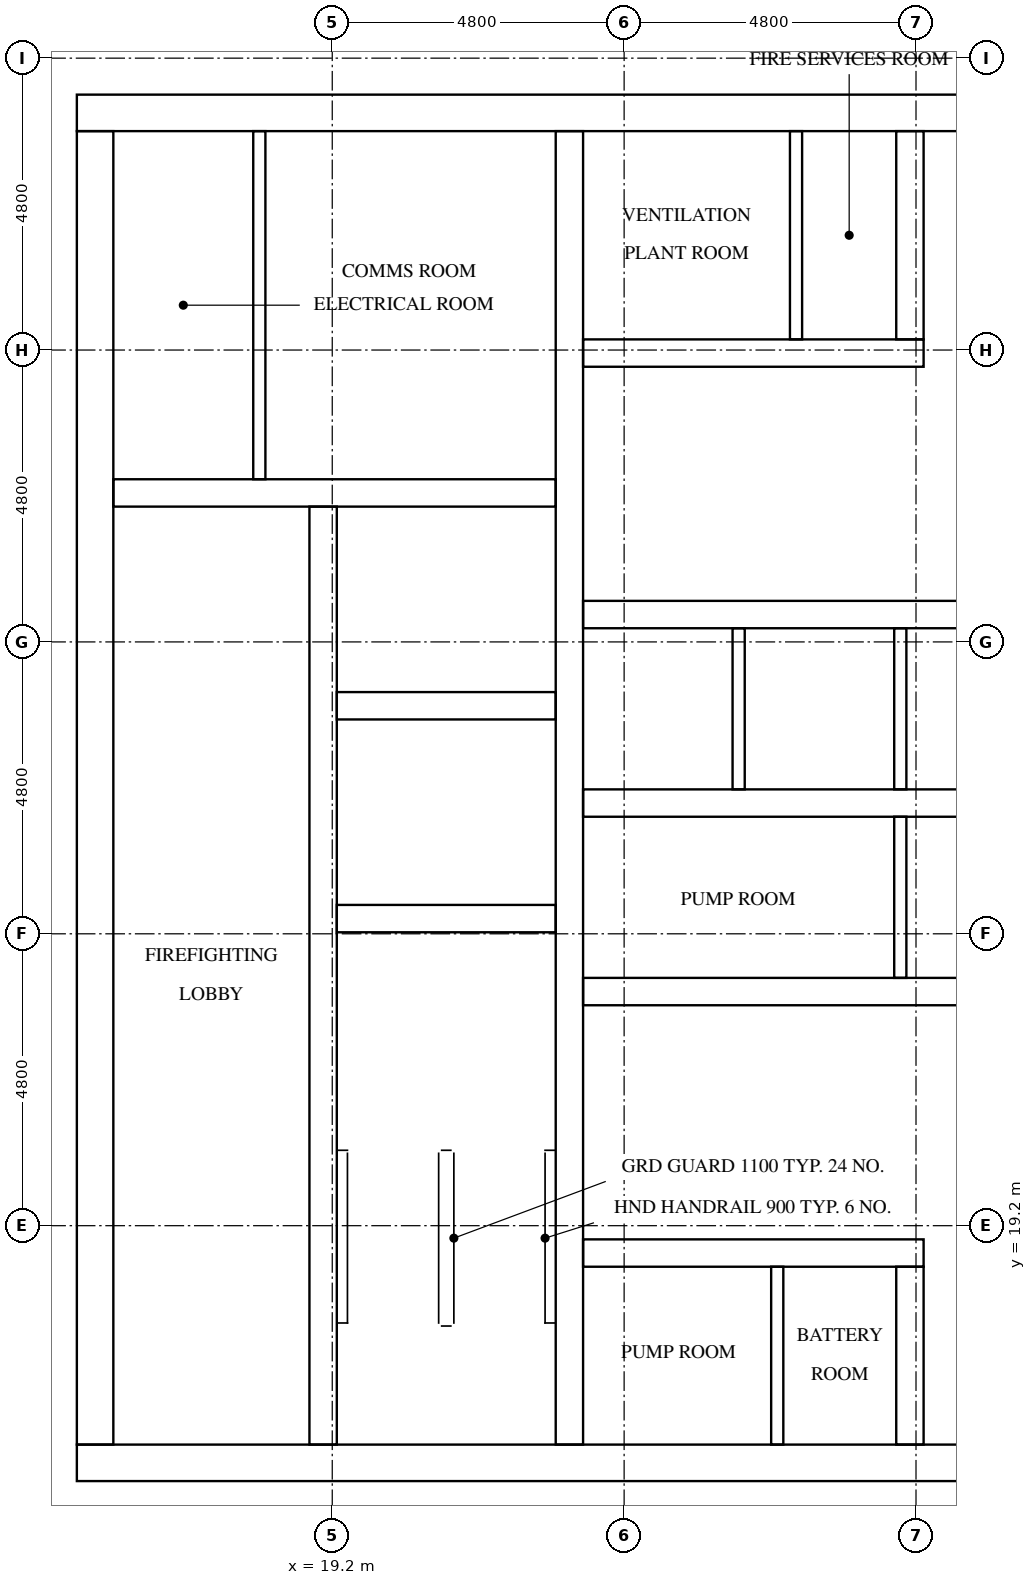
"""IFC4 building model, lengths in metres.
Left out: names, types, materials, properties, quantities, classifications, styles, units other than length and angle.
Written with IfcOpenShell. Run it as: python <this file> out.ifc"""

import sys

from ifc_helpers import new_model, si_unit, direction, frame, frame_2d, origin, place, context, subcontext, project, spatial, rectangle, extrude, element, fill, save


model = new_model("IFC4")
c1 = context("Model", 3, precision=1e-05, world=origin(), true_north=direction((0.0, 1.0)))
c2 = subcontext(c1, "Body", "Model", "MODEL_VIEW")
j1 = project(units=[si_unit("LENGTHUNIT", "METRE"), si_unit("PLANEANGLEUNIT", "RADIAN")], contexts=[c1])
p1 = place(None, origin())
s1 = spatial("IfcSite", under=j1, at=p1, CompositionType="ELEMENT")
p2 = place(p1, origin())
s2 = spatial("IfcBuilding", under=s1, at=p2, CompositionType="ELEMENT")
p3 = place(p2, frame((0.0, 0.0, 259.7)))
s3 = spatial("IfcBuildingStorey", under=s2, at=p3, CompositionType="ELEMENT", Elevation=259.7)
p4 = place(p3, frame((15.0, 15.3, 0.0), z_axis=(0.0, 0.0, 1.0), x_axis=(1.0, 0.0, 0.0)))
e1 = element("IfcWall", 1, at=p4, inside=s3, PredefinedType="SHEAR", context=c2, shape_type="SweptSolid", body=[
    extrude(rectangle(XDim=32.4, YDim=0.6, at=frame_2d((16.2, 0.0))), origin(), (0.0, 0.0, 1.0), 3.1),
])
p5 = place(p4, frame((15.3, 0.0, 0.0)))
e2 = element("IfcOpeningElement", 2, at=p5, cuts=e1, PredefinedType="OPENING", context=c2, shape_type="SweptSolid", body=[
    extrude(rectangle(XDim=1.8, YDim=2.1, at=frame_2d((0.9, 1.05))), frame((0.0, 0.31, 0.0), z_axis=(0.0, -1.0, 0.0), x_axis=(1.0, 0.0, 0.0)), (0.0, 0.0, 1.0), 0.62),
])
p6 = place(p3, frame((15.0, 37.5, 0.0), z_axis=(0.0, 0.0, 1.0), x_axis=(1.0, 0.0, 0.0)))
e3 = element("IfcWall", 3, at=p6, inside=s3, PredefinedType="SHEAR", context=c2, shape_type="SweptSolid", body=[
    extrude(rectangle(XDim=32.4, YDim=0.6, at=frame_2d((16.2, 0.0))), origin(), (0.0, 0.0, 1.0), 3.1),
])
p7 = place(p6, frame((15.3, 0.0, 0.0)))
e4 = element("IfcOpeningElement", 4, at=p7, cuts=e3, PredefinedType="OPENING", context=c2, shape_type="SweptSolid", body=[
    extrude(rectangle(XDim=1.8, YDim=2.1, at=frame_2d((0.9, 1.05))), frame((0.0, 0.31, 0.0), z_axis=(0.0, -1.0, 0.0), x_axis=(1.0, 0.0, 0.0)), (0.0, 0.0, 1.0), 0.62),
])
p8 = place(p6, frame((1.25, 0.0, 0.0)))
e5 = element("IfcOpeningElement", 5, at=p8, cuts=e3, PredefinedType="OPENING", context=c2, shape_type="SweptSolid", body=[
    extrude(rectangle(XDim=1.0, YDim=2.1, at=frame_2d((0.5, 1.05))), frame((0.0, 0.31, 0.0), z_axis=(0.0, -1.0, 0.0), x_axis=(1.0, 0.0, 0.0)), (0.0, 0.0, 1.0), 0.62),
])
p9 = place(p6, frame((4.988, 0.0, 0.0)))
e6 = element("IfcOpeningElement", 6, at=p9, cuts=e3, PredefinedType="OPENING", context=c2, shape_type="SweptSolid", body=[
    extrude(rectangle(XDim=1.0, YDim=2.1, at=frame_2d((0.5, 1.05))), frame((0.0, 0.31, 0.0), z_axis=(0.0, -1.0, 0.0), x_axis=(1.0, 0.0, 0.0)), (0.0, 0.0, 1.0), 0.62),
])
p10 = place(p3, frame((15.3, 15.6, 0.0), z_axis=(0.0, 0.0, 1.0), x_axis=(0.0, 1.0, 0.0)))
e7 = element("IfcWall", 7, at=p10, inside=s3, PredefinedType="SHEAR", context=c2, shape_type="SweptSolid", body=[
    extrude(rectangle(XDim=21.6, YDim=0.6, at=frame_2d((10.8, 0.0))), origin(), (0.0, 0.0, 1.0), 3.1),
])
p11 = place(p10, frame((5.16, 0.0, 0.0)))
e8 = element("IfcOpeningElement", 8, at=p11, cuts=e7, PredefinedType="OPENING", context=c2, shape_type="SweptSolid", body=[
    extrude(rectangle(XDim=1.2, YDim=2.1, at=frame_2d((0.6, 1.05))), frame((0.0, 0.31, 0.0), z_axis=(0.0, -1.0, 0.0), x_axis=(1.0, 0.0, 0.0)), (0.0, 0.0, 1.0), 0.62),
])
p12 = place(p3, frame((19.05, 15.6, 0.0), z_axis=(0.0, 0.0, 1.0), x_axis=(0.0, 1.0, 0.0)))
e9 = element("IfcWall", 9, at=p12, inside=s3, PredefinedType="SHEAR", context=c2, shape_type="SweptSolid", body=[
    extrude(rectangle(XDim=15.425, YDim=0.45, at=frame_2d((7.712, 0.0))), origin(), (0.0, 0.0, 1.0), 3.1),
])
p13 = place(p12, frame((9.85, 0.0, 0.0)))
e10 = element("IfcOpeningElement", 10, at=p13, cuts=e9, PredefinedType="OPENING", context=c2, shape_type="SweptSolid", body=[
    extrude(rectangle(XDim=1.1, YDim=2.1, at=frame_2d((0.55, 1.05))), frame((0.0, 0.235, 0.0), z_axis=(0.0, -1.0, 0.0), x_axis=(1.0, 0.0, 0.0)), (0.0, 0.0, 1.0), 0.47),
])
p14 = place(p12, frame((13.35, 0.0, 0.0)))
e11 = element("IfcOpeningElement", 11, at=p14, cuts=e9, PredefinedType="OPENING", context=c2, shape_type="SweptSolid", body=[
    extrude(rectangle(XDim=1.1, YDim=2.1, at=frame_2d((0.55, 1.05))), frame((0.0, 0.235, 0.0), z_axis=(0.0, -1.0, 0.0), x_axis=(1.0, 0.0, 0.0)), (0.0, 0.0, 1.0), 0.47),
])
p15 = place(p12, frame((0.6, 0.0, 0.0)))
e12 = element("IfcOpeningElement", 12, at=p15, cuts=e9, PredefinedType="OPENING", context=c2, shape_type="SweptSolid", body=[
    extrude(rectangle(XDim=1.2, YDim=2.1, at=frame_2d((0.6, 1.05))), frame((0.0, 0.235, 0.0), z_axis=(0.0, -1.0, 0.0), x_axis=(1.0, 0.0, 0.0)), (0.0, 0.0, 1.0), 0.47),
])
p16 = place(p3, frame((23.1, 15.6, 0.0), z_axis=(0.0, 0.0, 1.0), x_axis=(0.0, 1.0, 0.0)))
e13 = element("IfcWall", 13, at=p16, inside=s3, PredefinedType="SHEAR", context=c2, shape_type="SweptSolid", body=[
    extrude(rectangle(XDim=21.6, YDim=0.45, at=frame_2d((10.8, 0.0))), origin(), (0.0, 0.0, 1.0), 3.1),
])
for number, where, z_axis, x_axis in (
    (14, (19.275, 24.25, 0.0), (0.0, 0.0, 1.0), (1.0, 0.0, 0.0)),
    (15, (19.275, 27.75, 0.0), (0.0, 0.0, 1.0), (1.0, 0.0, 0.0)),
):
    element("IfcWall", number, at=place(p3, frame(where, z_axis=z_axis, x_axis=x_axis)), inside=s3, PredefinedType="SHEAR", context=c2, shape_type="SweptSolid", body=[
        extrude(rectangle(XDim=3.6, YDim=0.45, at=frame_2d((1.8, 0.0))), origin(), (0.0, 0.0, 1.0), 3.1),
    ])
p17 = place(p3, frame((15.6, 31.25, 0.0), z_axis=(0.0, 0.0, 1.0), x_axis=(1.0, 0.0, 0.0)))
e16 = element("IfcWall", 16, at=p17, inside=s3, PredefinedType="SHEAR", context=c2, shape_type="SweptSolid", body=[
    extrude(rectangle(XDim=7.275, YDim=0.45, at=frame_2d((3.637, 0.0))), origin(), (0.0, 0.0, 1.0), 3.1),
])
p18 = place(p3, frame((23.325, 18.75, 0.0), z_axis=(0.0, 0.0, 1.0), x_axis=(1.0, 0.0, 0.0)))
e17 = element("IfcWall", 17, at=p18, inside=s3, PredefinedType="SHEAR", context=c2, shape_type="SweptSolid", body=[
    extrude(rectangle(XDim=5.6, YDim=0.45, at=frame_2d((2.8, 0.0))), origin(), (0.0, 0.0, 1.0), 3.1),
])
p19 = place(p18, frame((1.046, 0.0, 0.0)))
e18 = element("IfcOpeningElement", 18, at=p19, cuts=e17, PredefinedType="OPENING", context=c2, shape_type="SweptSolid", body=[
    extrude(rectangle(XDim=1.0, YDim=2.1, at=frame_2d((0.5, 1.05))), frame((0.0, 0.235, 0.0), z_axis=(0.0, -1.0, 0.0), x_axis=(1.0, 0.0, 0.0)), (0.0, 0.0, 1.0), 0.47),
])
p20 = place(p18, frame((3.721, 0.0, 0.0)))
e19 = element("IfcOpeningElement", 19, at=p20, cuts=e17, PredefinedType="OPENING", context=c2, shape_type="SweptSolid", body=[
    extrude(rectangle(XDim=1.0, YDim=2.1, at=frame_2d((0.5, 1.05))), frame((0.0, 0.235, 0.0), z_axis=(0.0, -1.0, 0.0), x_axis=(1.0, 0.0, 0.0)), (0.0, 0.0, 1.0), 0.47),
])
p21 = place(p3, frame((23.325, 23.05, 0.0), z_axis=(0.0, 0.0, 1.0), x_axis=(1.0, 0.0, 0.0)))
e20 = element("IfcWall", 20, at=p21, inside=s3, PredefinedType="SHEAR", context=c2, shape_type="SweptSolid", body=[
    extrude(rectangle(XDim=15.75, YDim=0.45, at=frame_2d((7.875, 0.0))), origin(), (0.0, 0.0, 1.0), 3.1),
])
p22 = place(p21, frame((2.058, 0.0, 0.0)))
e21 = element("IfcOpeningElement", 21, at=p22, cuts=e20, PredefinedType="OPENING", context=c2, shape_type="SweptSolid", body=[
    extrude(rectangle(XDim=1.0, YDim=2.1, at=frame_2d((0.5, 1.05))), frame((0.0, 0.235, 0.0), z_axis=(0.0, -1.0, 0.0), x_axis=(1.0, 0.0, 0.0)), (0.0, 0.0, 1.0), 0.47),
])
p23 = place(p21, frame((11.823, 0.0, 0.0)))
e22 = element("IfcOpeningElement", 22, at=p23, cuts=e20, PredefinedType="OPENING", context=c2, shape_type="SweptSolid", body=[
    extrude(rectangle(XDim=1.0, YDim=2.1, at=frame_2d((0.5, 1.05))), frame((0.0, 0.235, 0.0), z_axis=(0.0, -1.0, 0.0), x_axis=(1.0, 0.0, 0.0)), (0.0, 0.0, 1.0), 0.47),
])
p24 = place(p21, frame((14.481, 0.0, 0.0)))
e23 = element("IfcOpeningElement", 23, at=p24, cuts=e20, PredefinedType="OPENING", context=c2, shape_type="SweptSolid", body=[
    extrude(rectangle(XDim=1.0, YDim=2.1, at=frame_2d((0.5, 1.05))), frame((0.0, 0.235, 0.0), z_axis=(0.0, -1.0, 0.0), x_axis=(1.0, 0.0, 0.0)), (0.0, 0.0, 1.0), 0.47),
])
p25 = place(p3, frame((23.325, 26.15, 0.0), z_axis=(0.0, 0.0, 1.0), x_axis=(1.0, 0.0, 0.0)))
e24 = element("IfcWall", 24, at=p25, inside=s3, PredefinedType="SHEAR", context=c2, shape_type="SweptSolid", body=[
    extrude(rectangle(XDim=15.75, YDim=0.45, at=frame_2d((7.875, 0.0))), origin(), (0.0, 0.0, 1.0), 3.1),
])
p26 = place(p3, frame((23.325, 29.25, 0.0), z_axis=(0.0, 0.0, 1.0), x_axis=(1.0, 0.0, 0.0)))
e25 = element("IfcWall", 25, at=p26, inside=s3, PredefinedType="SHEAR", context=c2, shape_type="SweptSolid", body=[
    extrude(rectangle(XDim=15.75, YDim=0.45, at=frame_2d((7.875, 0.0))), origin(), (0.0, 0.0, 1.0), 3.1),
])
p27 = place(p26, frame((0.679, 0.0, 0.0)))
e26 = element("IfcOpeningElement", 26, at=p27, cuts=e25, PredefinedType="OPENING", context=c2, shape_type="SweptSolid", body=[
    extrude(rectangle(XDim=1.1, YDim=2.1, at=frame_2d((0.55, 1.05))), frame((0.0, 0.235, 0.0), z_axis=(0.0, -1.0, 0.0), x_axis=(1.0, 0.0, 0.0)), (0.0, 0.0, 1.0), 0.47),
])
p28 = place(p26, frame((3.337, 0.0, 0.0)))
e27 = element("IfcOpeningElement", 27, at=p28, cuts=e25, PredefinedType="OPENING", context=c2, shape_type="SweptSolid", body=[
    extrude(rectangle(XDim=1.1, YDim=2.1, at=frame_2d((0.55, 1.05))), frame((0.0, 0.235, 0.0), z_axis=(0.0, -1.0, 0.0), x_axis=(1.0, 0.0, 0.0)), (0.0, 0.0, 1.0), 0.47),
])
p29 = place(p26, frame((5.996, 0.0, 0.0)))
e28 = element("IfcOpeningElement", 28, at=p29, cuts=e25, PredefinedType="OPENING", context=c2, shape_type="SweptSolid", body=[
    extrude(rectangle(XDim=1.1, YDim=2.1, at=frame_2d((0.55, 1.05))), frame((0.0, 0.235, 0.0), z_axis=(0.0, -1.0, 0.0), x_axis=(1.0, 0.0, 0.0)), (0.0, 0.0, 1.0), 0.47),
])
p30 = place(p26, frame((8.654, 0.0, 0.0)))
e29 = element("IfcOpeningElement", 29, at=p30, cuts=e25, PredefinedType="OPENING", context=c2, shape_type="SweptSolid", body=[
    extrude(rectangle(XDim=1.1, YDim=2.1, at=frame_2d((0.55, 1.05))), frame((0.0, 0.235, 0.0), z_axis=(0.0, -1.0, 0.0), x_axis=(1.0, 0.0, 0.0)), (0.0, 0.0, 1.0), 0.47),
])
p31 = place(p26, frame((11.312, 0.0, 0.0)))
e30 = element("IfcOpeningElement", 30, at=p31, cuts=e25, PredefinedType="OPENING", context=c2, shape_type="SweptSolid", body=[
    extrude(rectangle(XDim=1.1, YDim=2.1, at=frame_2d((0.55, 1.05))), frame((0.0, 0.235, 0.0), z_axis=(0.0, -1.0, 0.0), x_axis=(1.0, 0.0, 0.0)), (0.0, 0.0, 1.0), 0.47),
])
p32 = place(p26, frame((13.971, 0.0, 0.0)))
e31 = element("IfcOpeningElement", 31, at=p32, cuts=e25, PredefinedType="OPENING", context=c2, shape_type="SweptSolid", body=[
    extrude(rectangle(XDim=1.1, YDim=2.1, at=frame_2d((0.55, 1.05))), frame((0.0, 0.235, 0.0), z_axis=(0.0, -1.0, 0.0), x_axis=(1.0, 0.0, 0.0)), (0.0, 0.0, 1.0), 0.47),
])
p33 = place(p3, frame((23.325, 33.55, 0.0), z_axis=(0.0, 0.0, 1.0), x_axis=(1.0, 0.0, 0.0)))
e32 = element("IfcWall", 32, at=p33, inside=s3, PredefinedType="SHEAR", context=c2, shape_type="SweptSolid", body=[
    extrude(rectangle(XDim=5.6, YDim=0.45, at=frame_2d((2.8, 0.0))), origin(), (0.0, 0.0, 1.0), 3.1),
])
p34 = place(p33, frame((1.201, 0.0, 0.0)))
e33 = element("IfcOpeningElement", 33, at=p34, cuts=e32, PredefinedType="OPENING", context=c2, shape_type="SweptSolid", body=[
    extrude(rectangle(XDim=1.0, YDim=2.1, at=frame_2d((0.5, 1.05))), frame((0.0, 0.235, 0.0), z_axis=(0.0, -1.0, 0.0), x_axis=(1.0, 0.0, 0.0)), (0.0, 0.0, 1.0), 0.47),
])
p35 = place(p33, frame((3.876, 0.0, 0.0)))
e34 = element("IfcOpeningElement", 34, at=p35, cuts=e32, PredefinedType="OPENING", context=c2, shape_type="SweptSolid", body=[
    extrude(rectangle(XDim=1.0, YDim=2.1, at=frame_2d((0.5, 1.05))), frame((0.0, 0.235, 0.0), z_axis=(0.0, -1.0, 0.0), x_axis=(1.0, 0.0, 0.0)), (0.0, 0.0, 1.0), 0.47),
])
p36 = place(p3, frame((28.7, 15.6, 0.0), z_axis=(0.0, 0.0, 1.0), x_axis=(0.0, 1.0, 0.0)))
e35 = element("IfcWall", 35, at=p36, inside=s3, PredefinedType="SHEAR", context=c2, shape_type="SweptSolid", body=[
    extrude(rectangle(XDim=2.925, YDim=0.45, at=frame_2d((1.462, 0.0))), origin(), (0.0, 0.0, 1.0), 3.1),
])
p37 = place(p3, frame((28.7, 33.775, 0.0), z_axis=(0.0, 0.0, 1.0), x_axis=(0.0, 1.0, 0.0)))
e36 = element("IfcWall", 36, at=p37, inside=s3, PredefinedType="SHEAR", context=c2, shape_type="SweptSolid", body=[
    extrude(rectangle(XDim=3.425, YDim=0.45, at=frame_2d((1.712, 0.0))), origin(), (0.0, 0.0, 1.0), 3.1),
])
p38 = place(p3, frame((25.883, 26.375, 0.0), z_axis=(0.0, 0.0, 1.0), x_axis=(0.0, 1.0, 0.0)))
e37 = element("IfcWall", 37, at=p38, inside=s3, PredefinedType="SOLIDWALL", context=c2, shape_type="SweptSolid", body=[
    extrude(rectangle(XDim=2.65, YDim=0.2, at=frame_2d((1.325, 0.0))), origin(), (0.0, 0.0, 1.0), 3.1),
])
p39 = place(p3, frame((28.542, 23.275, 0.0), z_axis=(0.0, 0.0, 1.0), x_axis=(0.0, 1.0, 0.0)))
e38 = element("IfcWall", 38, at=p39, inside=s3, PredefinedType="SOLIDWALL", context=c2, shape_type="SweptSolid", body=[
    extrude(rectangle(XDim=2.65, YDim=0.2, at=frame_2d((1.325, 0.0))), origin(), (0.0, 0.0, 1.0), 3.1),
])
p40 = place(p3, frame((28.542, 26.375, 0.0), z_axis=(0.0, 0.0, 1.0), x_axis=(0.0, 1.0, 0.0)))
e39 = element("IfcWall", 39, at=p40, inside=s3, PredefinedType="SOLIDWALL", context=c2, shape_type="SweptSolid", body=[
    extrude(rectangle(XDim=2.65, YDim=0.2, at=frame_2d((1.325, 0.0))), origin(), (0.0, 0.0, 1.0), 3.1),
])
p41 = place(p3, frame((18.001, 31.475, 0.0), z_axis=(0.0, 0.0, 1.0), x_axis=(0.0, 1.0, 0.0)))
e40 = element("IfcWall", 40, at=p41, inside=s3, PredefinedType="PARTITIONING", context=c2, shape_type="SweptSolid", body=[
    extrude(rectangle(XDim=5.725, YDim=0.2, at=frame_2d((2.862, 0.0))), origin(), (0.0, 0.0, 1.0), 3.1),
])
p42 = place(p3, frame((26.518, 15.6, 0.0), z_axis=(0.0, 0.0, 1.0), x_axis=(0.0, 1.0, 0.0)))
e41 = element("IfcWall", 41, at=p42, inside=s3, PredefinedType="PARTITIONING", context=c2, shape_type="SweptSolid", body=[
    extrude(rectangle(XDim=2.925, YDim=0.2, at=frame_2d((1.462, 0.0))), origin(), (0.0, 0.0, 1.0), 3.1),
])
p43 = place(p3, frame((26.827, 33.775, 0.0), z_axis=(0.0, 0.0, 1.0), x_axis=(0.0, 1.0, 0.0)))
e42 = element("IfcWall", 42, at=p43, inside=s3, PredefinedType="PARTITIONING", context=c2, shape_type="SweptSolid", body=[
    extrude(rectangle(XDim=3.425, YDim=0.2, at=frame_2d((1.712, 0.0))), origin(), (0.0, 0.0, 1.0), 3.1),
])
p44 = place(p27, origin())
e43 = element("IfcDoor", 43, at=p44, inside=s3, OperationType="DOUBLE_DOOR_SLIDING", PredefinedType="DOOR", context=c2, shape_type="SweptSolid", body=[
    extrude(rectangle(XDim=1.1, YDim=2.1, at=frame_2d((0.55, 1.05))), frame((0.0, 0.025, 0.0), z_axis=(0.0, -1.0, 0.0), x_axis=(1.0, 0.0, 0.0)), (0.0, 0.0, 1.0), 0.05),
])
fill(e26, e43)
p45 = place(p28, origin())
e44 = element("IfcDoor", 44, at=p45, inside=s3, OperationType="DOUBLE_DOOR_SLIDING", PredefinedType="DOOR", context=c2, shape_type="SweptSolid", body=[
    extrude(rectangle(XDim=1.1, YDim=2.1, at=frame_2d((0.55, 1.05))), frame((0.0, 0.025, 0.0), z_axis=(0.0, -1.0, 0.0), x_axis=(1.0, 0.0, 0.0)), (0.0, 0.0, 1.0), 0.05),
])
fill(e27, e44)
p46 = place(p29, origin())
e45 = element("IfcDoor", 45, at=p46, inside=s3, OperationType="DOUBLE_DOOR_SLIDING", PredefinedType="DOOR", context=c2, shape_type="SweptSolid", body=[
    extrude(rectangle(XDim=1.1, YDim=2.1, at=frame_2d((0.55, 1.05))), frame((0.0, 0.025, 0.0), z_axis=(0.0, -1.0, 0.0), x_axis=(1.0, 0.0, 0.0)), (0.0, 0.0, 1.0), 0.05),
])
fill(e28, e45)
p47 = place(p13, origin())
e46 = element("IfcDoor", 46, at=p47, inside=s3, OperationType="DOUBLE_DOOR_SLIDING", PredefinedType="DOOR", context=c2, shape_type="SweptSolid", body=[
    extrude(rectangle(XDim=1.1, YDim=2.1, at=frame_2d((0.55, 1.05))), frame((0.0, 0.025, 0.0), z_axis=(0.0, -1.0, 0.0), x_axis=(1.0, 0.0, 0.0)), (0.0, 0.0, 1.0), 0.05),
])
fill(e10, e46)
p48 = place(p14, origin())
e47 = element("IfcDoor", 47, at=p48, inside=s3, OperationType="DOUBLE_DOOR_SLIDING", PredefinedType="DOOR", context=c2, shape_type="SweptSolid", body=[
    extrude(rectangle(XDim=1.1, YDim=2.1, at=frame_2d((0.55, 1.05))), frame((0.0, 0.025, 0.0), z_axis=(0.0, -1.0, 0.0), x_axis=(1.0, 0.0, 0.0)), (0.0, 0.0, 1.0), 0.05),
])
fill(e11, e47)
p49 = place(p15, frame((1.2, 0.0, 0.0), z_axis=(0.0, 0.0, 1.0), x_axis=(-1.0, 0.0, 0.0)))
e48 = element("IfcDoor", 48, at=p49, inside=s3, OperationType="SINGLE_SWING_RIGHT", PredefinedType="DOOR", context=c2, shape_type="SweptSolid", body=[
    extrude(rectangle(XDim=1.2, YDim=2.1, at=frame_2d((0.6, 1.05))), frame((0.0, 0.025, 0.0), z_axis=(0.0, -1.0, 0.0), x_axis=(1.0, 0.0, 0.0)), (0.0, 0.0, 1.0), 0.05),
])
fill(e12, e48)
p50 = place(p11, frame((1.2, 0.0, 0.0), z_axis=(0.0, 0.0, 1.0), x_axis=(-1.0, 0.0, 0.0)))
e49 = element("IfcDoor", 49, at=p50, inside=s3, OperationType="SINGLE_SWING_LEFT", PredefinedType="DOOR", context=c2, shape_type="SweptSolid", body=[
    extrude(rectangle(XDim=1.2, YDim=2.1, at=frame_2d((0.6, 1.05))), frame((0.0, 0.025, 0.0), z_axis=(0.0, -1.0, 0.0), x_axis=(1.0, 0.0, 0.0)), (0.0, 0.0, 1.0), 0.05),
])
fill(e8, e49)
p51 = place(p8, origin())
e50 = element("IfcDoor", 50, at=p51, inside=s3, OperationType="SINGLE_SWING_LEFT", PredefinedType="DOOR", context=c2, shape_type="SweptSolid", body=[
    extrude(rectangle(XDim=1.0, YDim=2.1, at=frame_2d((0.5, 1.05))), frame((0.0, 0.025, 0.0), z_axis=(0.0, -1.0, 0.0), x_axis=(1.0, 0.0, 0.0)), (0.0, 0.0, 1.0), 0.05),
])
fill(e5, e50)
p52 = place(p9, origin())
e51 = element("IfcDoor", 51, at=p52, inside=s3, OperationType="SINGLE_SWING_RIGHT", PredefinedType="DOOR", context=c2, shape_type="SweptSolid", body=[
    extrude(rectangle(XDim=1.0, YDim=2.1, at=frame_2d((0.5, 1.05))), frame((0.0, 0.025, 0.0), z_axis=(0.0, -1.0, 0.0), x_axis=(1.0, 0.0, 0.0)), (0.0, 0.0, 1.0), 0.05),
])
fill(e6, e51)
p53 = place(p22, frame((1.0, 0.0, 0.0), z_axis=(0.0, 0.0, 1.0), x_axis=(-1.0, 0.0, 0.0)))
e52 = element("IfcDoor", 52, at=p53, inside=s3, OperationType="SINGLE_SWING_LEFT", PredefinedType="DOOR", context=c2, shape_type="SweptSolid", body=[
    extrude(rectangle(XDim=1.0, YDim=2.1, at=frame_2d((0.5, 1.05))), frame((0.0, 0.025, 0.0), z_axis=(0.0, -1.0, 0.0), x_axis=(1.0, 0.0, 0.0)), (0.0, 0.0, 1.0), 0.05),
])
fill(e21, e52)
p54 = place(p19, origin())
e53 = element("IfcDoor", 53, at=p54, inside=s3, OperationType="SINGLE_SWING_RIGHT", PredefinedType="DOOR", context=c2, shape_type="SweptSolid", body=[
    extrude(rectangle(XDim=1.0, YDim=2.1, at=frame_2d((0.5, 1.05))), frame((0.0, 0.025, 0.0), z_axis=(0.0, -1.0, 0.0), x_axis=(1.0, 0.0, 0.0)), (0.0, 0.0, 1.0), 0.05),
])
fill(e18, e53)
p55 = place(p20, origin())
e54 = element("IfcDoor", 54, at=p55, inside=s3, OperationType="SINGLE_SWING_LEFT", PredefinedType="DOOR", context=c2, shape_type="SweptSolid", body=[
    extrude(rectangle(XDim=1.0, YDim=2.1, at=frame_2d((0.5, 1.05))), frame((0.0, 0.025, 0.0), z_axis=(0.0, -1.0, 0.0), x_axis=(1.0, 0.0, 0.0)), (0.0, 0.0, 1.0), 0.05),
])
fill(e19, e54)
p56 = place(p34, frame((1.0, 0.0, 0.0), z_axis=(0.0, 0.0, 1.0), x_axis=(-1.0, 0.0, 0.0)))
e55 = element("IfcDoor", 55, at=p56, inside=s3, OperationType="SINGLE_SWING_RIGHT", PredefinedType="DOOR", context=c2, shape_type="SweptSolid", body=[
    extrude(rectangle(XDim=1.0, YDim=2.1, at=frame_2d((0.5, 1.05))), frame((0.0, 0.025, 0.0), z_axis=(0.0, -1.0, 0.0), x_axis=(1.0, 0.0, 0.0)), (0.0, 0.0, 1.0), 0.05),
])
fill(e33, e55)
p57 = place(p35, frame((1.0, 0.0, 0.0), z_axis=(0.0, 0.0, 1.0), x_axis=(-1.0, 0.0, 0.0)))
e56 = element("IfcDoor", 56, at=p57, inside=s3, OperationType="SINGLE_SWING_LEFT", PredefinedType="DOOR", context=c2, shape_type="SweptSolid", body=[
    extrude(rectangle(XDim=1.0, YDim=2.1, at=frame_2d((0.5, 1.05))), frame((0.0, 0.025, 0.0), z_axis=(0.0, -1.0, 0.0), x_axis=(1.0, 0.0, 0.0)), (0.0, 0.0, 1.0), 0.05),
])
fill(e34, e56)
save(model, sys.argv[1])
